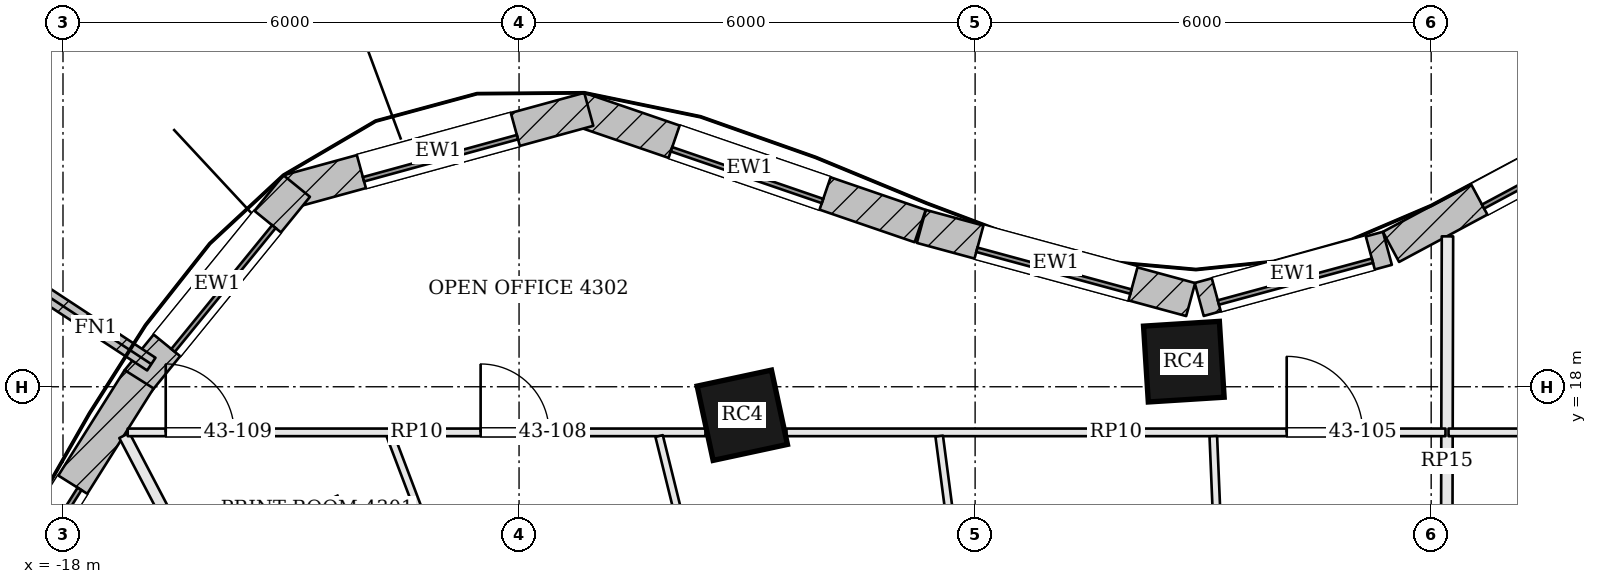
"""IFC4 building model, lengths in metres.
Left out: names, types, materials, properties, quantities, classifications, styles, units other than length and angle.
Written with IfcOpenShell. Run it as: python <this file> out.ifc"""

import sys

from ifc_helpers import new_model, si_unit, direction, frame, frame_2d, origin, origin_2d, place, context, subcontext, project, spatial, rectangle, extrude, element, fill, save


model = new_model("IFC4")
c1 = context("Model", 3, precision=1e-05, world=origin(), true_north=direction((0.0, 1.0)))
c2 = subcontext(c1, "Body", "Model", "MODEL_VIEW")
j1 = project(units=[si_unit("LENGTHUNIT", "METRE"), si_unit("PLANEANGLEUNIT", "RADIAN")], contexts=[c1])
p1 = place(None, origin())
s1 = spatial("IfcSite", under=j1, at=p1, CompositionType="ELEMENT")
p2 = place(p1, origin())
s2 = spatial("IfcBuilding", under=s1, at=p2, CompositionType="ELEMENT")
p3 = place(p2, frame((0.0, 0.0, 177.9)))
s3 = spatial("IfcBuildingStorey", under=s2, at=p3, CompositionType="ELEMENT", Elevation=177.9)
for number, where, z_axis, x_axis in (
    (1, (-3.254, 18.33, 0.0), (0.0, 0.0, 1.0), (-0.998, -0.063, 0.0)),
    (2, (-9.063, 17.625, 0.0), (0.0, 0.0, 1.0), (-0.978, -0.21, 0.0)),
    (3, (-14.643, 15.881, 0.0), (0.0, 0.0, 1.0), (-0.909, -0.417, 0.0)),
):
    element("IfcColumn", number, at=place(p3, frame(where, z_axis=z_axis, x_axis=x_axis)), inside=s3, PredefinedType="COLUMN", context=c2, shape_type="SweptSolid", body=[
        extrude(rectangle(XDim=1.0, YDim=1.0, at=origin_2d()), origin(), (0.0, 0.0, 1.0), 3.9),
    ])
p4 = place(p3, frame((3.646, 22.079, 0.0), z_axis=(0.0, 0.0, 1.0), x_axis=(-0.881279133897, -0.472596115259, 0.0)))
e4 = element("IfcWall", 4, at=p4, inside=s3, PredefinedType="SOLIDWALL", context=c2, shape_type="SweptSolid", body=[
    extrude(rectangle(XDim=4.737, YDim=0.45, at=frame_2d((2.368, 0.0))), origin(), (0.0, 0.0, 1.0), 3.7),
])
p5 = place(p4, frame((1.318, 0.0, 0.9)))
e5 = element("IfcOpeningElement", 5, at=p5, cuts=e4, PredefinedType="OPENING", context=c2, shape_type="SweptSolid", body=[
    extrude(rectangle(XDim=2.1, YDim=2.3, at=frame_2d((1.05, 1.15))), frame((0.0, 0.235, 0.0), z_axis=(0.0, -1.0, 0.0), x_axis=(1.0, 0.0, 0.0)), (0.0, 0.0, 1.0), 0.47),
])
p6 = place(p3, frame((-0.576, 19.821, 0.0), z_axis=(0.0, 0.0, 1.0), x_axis=(-0.965009398019, -0.262215296532, 0.0)))
e6 = element("IfcWall", 6, at=p6, inside=s3, PredefinedType="SOLIDWALL", context=c2, shape_type="SweptSolid", body=[
    extrude(rectangle(XDim=2.565, YDim=0.45, at=frame_2d((1.283, 0.0))), origin(), (0.0, 0.0, 1.0), 3.7),
])
p7 = place(p6, frame((0.233, 0.0, 0.9)))
e7 = element("IfcOpeningElement", 7, at=p7, cuts=e6, PredefinedType="OPENING", context=c2, shape_type="SweptSolid", body=[
    extrude(rectangle(XDim=2.1, YDim=2.3, at=frame_2d((1.05, 1.15))), frame((0.0, 0.235, 0.0), z_axis=(0.0, -1.0, 0.0), x_axis=(1.0, 0.0, 0.0)), (0.0, 0.0, 1.0), 0.47),
])
p8 = place(p3, frame((-3.164, 19.147, 0.0), z_axis=(0.0, 0.0, 1.0), x_axis=(-0.965039479998, 0.262104563191, 0.0)))
e8 = element("IfcWall", 8, at=p8, inside=s3, PredefinedType="SOLIDWALL", context=c2, shape_type="SweptSolid", body=[
    extrude(rectangle(XDim=3.672, YDim=0.45, at=frame_2d((1.836, 0.0))), origin(), (0.0, 0.0, 1.0), 3.7),
])
p9 = place(p8, frame((0.786, 0.0, 0.9)))
e9 = element("IfcOpeningElement", 9, at=p9, cuts=e8, PredefinedType="OPENING", context=c2, shape_type="SweptSolid", body=[
    extrude(rectangle(XDim=2.1, YDim=2.3, at=frame_2d((1.05, 1.15))), frame((0.0, 0.235, 0.0), z_axis=(0.0, -1.0, 0.0), x_axis=(1.0, 0.0, 0.0)), (0.0, 0.0, 1.0), 0.47),
])
p10 = place(p3, frame((-6.723, 20.114, 0.0), z_axis=(0.0, 0.0, 1.0), x_axis=(-0.945947299026, 0.324320377815, 0.0)))
e10 = element("IfcWall", 10, at=p10, inside=s3, PredefinedType="SOLIDWALL", context=c2, shape_type="SweptSolid", body=[
    extrude(rectangle(XDim=4.745, YDim=0.45, at=frame_2d((2.372, 0.0))), origin(), (0.0, 0.0, 1.0), 3.7),
])
p11 = place(p10, frame((1.322, 0.0, 0.9)))
e11 = element("IfcOpeningElement", 11, at=p11, cuts=e10, PredefinedType="OPENING", context=c2, shape_type="SweptSolid", body=[
    extrude(rectangle(XDim=2.1, YDim=2.3, at=frame_2d((1.05, 1.15))), frame((0.0, 0.235, 0.0), z_axis=(0.0, -1.0, 0.0), x_axis=(1.0, 0.0, 0.0)), (0.0, 0.0, 1.0), 0.47),
])
p12 = place(p3, frame((-11.083, 21.65, 0.0), z_axis=(0.0, 0.0, 1.0), x_axis=(-0.964483204983, -0.264144179011, 0.0)))
e12 = element("IfcWall", 12, at=p12, inside=s3, PredefinedType="SOLIDWALL", context=c2, shape_type="SweptSolid", body=[
    extrude(rectangle(XDim=4.104, YDim=0.45, at=frame_2d((2.052, 0.0))), origin(), (0.0, 0.0, 1.0), 3.7),
])
p13 = place(p12, frame((1.002, 0.0, 0.9)))
e13 = element("IfcOpeningElement", 13, at=p13, cuts=e12, PredefinedType="OPENING", context=c2, shape_type="SweptSolid", body=[
    extrude(rectangle(XDim=2.1, YDim=2.3, at=frame_2d((1.05, 1.15))), frame((0.0, 0.235, 0.0), z_axis=(0.0, -1.0, 0.0), x_axis=(1.0, 0.0, 0.0)), (0.0, 0.0, 1.0), 0.47),
])
p14 = place(p3, frame((-14.926, 20.641, 0.0), z_axis=(0.0, 0.0, 1.0), x_axis=(-0.631548074669, -0.775336720001, 0.0)))
e14 = element("IfcWall", 14, at=p14, inside=s3, PredefinedType="SOLIDWALL", context=c2, shape_type="SweptSolid", body=[
    extrude(rectangle(XDim=3.308, YDim=0.45, at=frame_2d((1.654, 0.0))), origin(), (0.0, 0.0, 1.0), 3.7),
])
p15 = place(p14, frame((0.604, 0.0, 0.9)))
e15 = element("IfcOpeningElement", 15, at=p15, cuts=e14, PredefinedType="OPENING", context=c2, shape_type="SweptSolid", body=[
    extrude(rectangle(XDim=2.1, YDim=2.3, at=frame_2d((1.05, 1.15))), frame((0.0, 0.235, 0.0), z_axis=(0.0, -1.0, 0.0), x_axis=(1.0, 0.0, 0.0)), (0.0, 0.0, 1.0), 0.47),
])
p16 = place(p3, frame((-16.998, 18.099, 0.0), z_axis=(0.0, 0.0, 1.0), x_axis=(-0.532745661304, -0.846275404559, 0.0)))
e16 = element("IfcWall", 16, at=p16, inside=s3, PredefinedType="SOLIDWALL", context=c2, shape_type="SweptSolid", body=[
    extrude(rectangle(XDim=5.076, YDim=0.45, at=frame_2d((2.538, 0.0))), origin(), (0.0, 0.0, 1.0), 3.7),
])
p17 = place(p16, frame((1.638, 0.0, 0.9)))
e17 = element("IfcOpeningElement", 17, at=p17, cuts=e16, PredefinedType="OPENING", context=c2, shape_type="SweptSolid", body=[
    extrude(rectangle(XDim=1.8, YDim=2.3, at=frame_2d((0.9, 1.15))), frame((0.0, 0.235, 0.0), z_axis=(0.0, -1.0, 0.0), x_axis=(1.0, 0.0, 0.0)), (0.0, 0.0, 1.0), 0.47),
])
p18 = place(p3, frame((-16.838, 18.298, 0.0), z_axis=(0.0, 0.0, 1.0), x_axis=(-0.835871900419, 0.548924554097, 0.0)))
e18 = element("IfcWall", 18, at=p18, inside=s3, PredefinedType="SOLIDWALL", context=c2, shape_type="SweptSolid", body=[
    extrude(rectangle(XDim=1.75, YDim=0.2, at=frame_2d((0.875, 0.0))), origin(), (0.0, 0.0, 1.0), 3.7),
])
p19 = place(p3, frame((0.214, 19.979, 0.0), z_axis=(0.0, 0.0, 1.0), x_axis=(-0.002357118586, -0.999997221992, 0.0)))
e19 = element("IfcWall", 19, at=p19, inside=s3, PredefinedType="PARTITIONING", context=c2, shape_type="SweptSolid", body=[
    extrude(rectangle(XDim=5.904, YDim=0.15, at=frame_2d((2.952, 0.0))), origin(), (0.0, 0.0, 1.0), 3.234),
])
p20 = place(p3, frame((-17.193, 17.36, 0.0), z_axis=(0.0, 0.0, 1.0), x_axis=(0.463995225493, -0.885837699988, 0.0)))
e20 = element("IfcWall", 20, at=p20, inside=s3, PredefinedType="PARTITIONING", context=c2, shape_type="SweptSolid", body=[
    extrude(rectangle(XDim=4.651, YDim=0.15, at=frame_2d((2.325, 0.0))), origin(), (0.0, 0.0, 1.0), 3.234),
])
p21 = place(p3, frame((0.228, 17.4, 0.0), z_axis=(0.0, 0.0, 1.0), x_axis=(1.0, 0.0, 0.0)))
e21 = element("IfcWall", 21, at=p21, inside=s3, PredefinedType="PARTITIONING", context=c2, shape_type="SweptSolid", body=[
    extrude(rectangle(XDim=7.596, YDim=0.1, at=frame_2d((3.798, 0.0))), origin(), (0.0, 0.0, 1.0), 3.084),
])
p22 = place(p21, frame((3.894, 0.0, 0.0)))
e22 = element("IfcOpeningElement", 22, at=p22, cuts=e21, PredefinedType="OPENING", context=c2, shape_type="SweptSolid", body=[
    extrude(rectangle(XDim=0.9, YDim=2.1, at=frame_2d((0.45, 1.05))), frame((0.0, 0.06, 0.0), z_axis=(0.0, -1.0, 0.0), x_axis=(1.0, 0.0, 0.0)), (0.0, 0.0, 1.0), 0.12),
])
p23 = place(p3, frame((-17.149, 17.4, 0.0), z_axis=(0.0, 0.0, 1.0), x_axis=(1.0, 0.0, 0.0)))
e23 = element("IfcWall", 23, at=p23, inside=s3, PredefinedType="PARTITIONING", context=c2, shape_type="SweptSolid", body=[
    extrude(rectangle(XDim=7.602, YDim=0.1, at=frame_2d((3.801, 0.0))), origin(), (0.0, 0.0, 1.0), 3.084),
])
p24 = place(p23, frame((4.643, 0.0, 0.0)))
e24 = element("IfcOpeningElement", 24, at=p24, cuts=e23, PredefinedType="OPENING", context=c2, shape_type="SweptSolid", body=[
    extrude(rectangle(XDim=0.9, YDim=2.1, at=frame_2d((0.45, 1.05))), frame((0.0, 0.06, 0.0), z_axis=(0.0, -1.0, 0.0), x_axis=(1.0, 0.0, 0.0)), (0.0, 0.0, 1.0), 0.12),
])
p25 = place(p23, frame((0.5, 0.0, 0.0)))
e25 = element("IfcOpeningElement", 25, at=p25, cuts=e23, PredefinedType="OPENING", context=c2, shape_type="SweptSolid", body=[
    extrude(rectangle(XDim=0.9, YDim=2.1, at=frame_2d((0.45, 1.05))), frame((0.0, 0.06, 0.0), z_axis=(0.0, -1.0, 0.0), x_axis=(1.0, 0.0, 0.0)), (0.0, 0.0, 1.0), 0.12),
])
p26 = place(p3, frame((-8.483, 17.4, 0.0), z_axis=(0.0, 0.0, 1.0), x_axis=(1.0, 0.0, 0.0)))
e26 = element("IfcWall", 26, at=p26, inside=s3, PredefinedType="PARTITIONING", context=c2, shape_type="SweptSolid", body=[
    extrude(rectangle(XDim=8.671, YDim=0.1, at=frame_2d((4.335, 0.0))), origin(), (0.0, 0.0, 1.0), 3.084),
])
p27 = place(p26, frame((6.582, 0.0, 0.0)))
e27 = element("IfcOpeningElement", 27, at=p27, cuts=e26, PredefinedType="OPENING", context=c2, shape_type="SweptSolid", body=[
    extrude(rectangle(XDim=1.0, YDim=2.1, at=frame_2d((0.5, 1.05))), frame((0.0, 0.06, 0.0), z_axis=(0.0, -1.0, 0.0), x_axis=(1.0, 0.0, 0.0)), (0.0, 0.0, 1.0), 0.12),
])
p28 = place(p3, frame((-2.729, 14.075, 0.0), z_axis=(0.0, 0.0, 1.0), x_axis=(-0.042005382394, 0.99911738442, 0.0)))
e28 = element("IfcWall", 28, at=p28, inside=s3, PredefinedType="PARTITIONING", context=c2, shape_type="SweptSolid", body=[
    extrude(rectangle(XDim=3.278, YDim=0.1, at=frame_2d((1.639, 0.0))), origin(), (0.0, 0.0, 1.0), 3.084),
])
p29 = place(p3, frame((-6.043, 14.074, 0.0), z_axis=(0.0, 0.0, 1.0), x_axis=(-0.12990779889, 0.991526078219, 0.0)))
e29 = element("IfcWall", 29, at=p29, inside=s3, PredefinedType="PARTITIONING", context=c2, shape_type="SweptSolid", body=[
    extrude(rectangle(XDim=3.304, YDim=0.1, at=frame_2d((1.652, 0.0))), origin(), (0.0, 0.0, 1.0), 3.084),
])
p30 = place(p3, frame((-9.347, 14.073, 0.0), z_axis=(0.0, 0.0, 1.0), x_axis=(-0.239847329474, 0.970810619299, 0.0)))
e30 = element("IfcWall", 30, at=p30, inside=s3, PredefinedType="PARTITIONING", context=c2, shape_type="SweptSolid", body=[
    extrude(rectangle(XDim=3.377, YDim=0.1, at=frame_2d((1.689, 0.0))), origin(), (0.0, 0.0, 1.0), 3.084),
])
p31 = place(p3, frame((-12.447, 14.07, 0.0), z_axis=(0.0, 0.0, 1.0), x_axis=(-0.354534757725, 0.935042836219, 0.0)))
e31 = element("IfcWall", 31, at=p31, inside=s3, PredefinedType="PARTITIONING", context=c2, shape_type="SweptSolid", body=[
    extrude(rectangle(XDim=3.511, YDim=0.1, at=frame_2d((1.756, 0.0))), origin(), (0.0, 0.0, 1.0), 3.084),
])
p32 = place(p5, origin())
e32 = element("IfcWindow", 32, at=p32, inside=s3, PartitioningType="SINGLE_PANEL", PredefinedType="WINDOW", context=c2, shape_type="SweptSolid", body=[
    extrude(rectangle(XDim=2.1, YDim=2.3, at=frame_2d((1.05, 1.15))), frame((0.0, 0.135, 0.0), z_axis=(0.0, -1.0, 0.0), x_axis=(1.0, 0.0, 0.0)), (0.0, 0.0, 1.0), 0.06),
])
fill(e5, e32)
p33 = place(p7, origin())
e33 = element("IfcWindow", 33, at=p33, inside=s3, PartitioningType="SINGLE_PANEL", PredefinedType="WINDOW", context=c2, shape_type="SweptSolid", body=[
    extrude(rectangle(XDim=2.1, YDim=2.3, at=frame_2d((1.05, 1.15))), frame((0.0, 0.135, 0.0), z_axis=(0.0, -1.0, 0.0), x_axis=(1.0, 0.0, 0.0)), (0.0, 0.0, 1.0), 0.06),
])
fill(e7, e33)
p34 = place(p9, origin())
e34 = element("IfcWindow", 34, at=p34, inside=s3, PartitioningType="SINGLE_PANEL", PredefinedType="WINDOW", context=c2, shape_type="SweptSolid", body=[
    extrude(rectangle(XDim=2.1, YDim=2.3, at=frame_2d((1.05, 1.15))), frame((0.0, 0.135, 0.0), z_axis=(0.0, -1.0, 0.0), x_axis=(1.0, 0.0, 0.0)), (0.0, 0.0, 1.0), 0.06),
])
fill(e9, e34)
p35 = place(p11, origin())
e35 = element("IfcWindow", 35, at=p35, inside=s3, PartitioningType="SINGLE_PANEL", PredefinedType="WINDOW", context=c2, shape_type="SweptSolid", body=[
    extrude(rectangle(XDim=2.1, YDim=2.3, at=frame_2d((1.05, 1.15))), frame((0.0, 0.135, 0.0), z_axis=(0.0, -1.0, 0.0), x_axis=(1.0, 0.0, 0.0)), (0.0, 0.0, 1.0), 0.06),
])
fill(e11, e35)
p36 = place(p13, origin())
e36 = element("IfcWindow", 36, at=p36, inside=s3, PartitioningType="SINGLE_PANEL", PredefinedType="WINDOW", context=c2, shape_type="SweptSolid", body=[
    extrude(rectangle(XDim=2.1, YDim=2.3, at=frame_2d((1.05, 1.15))), frame((0.0, 0.135, 0.0), z_axis=(0.0, -1.0, 0.0), x_axis=(1.0, 0.0, 0.0)), (0.0, 0.0, 1.0), 0.06),
])
fill(e13, e36)
p37 = place(p15, origin())
e37 = element("IfcWindow", 37, at=p37, inside=s3, PartitioningType="SINGLE_PANEL", PredefinedType="WINDOW", context=c2, shape_type="SweptSolid", body=[
    extrude(rectangle(XDim=2.1, YDim=2.3, at=frame_2d((1.05, 1.15))), frame((0.0, 0.135, 0.0), z_axis=(0.0, -1.0, 0.0), x_axis=(1.0, 0.0, 0.0)), (0.0, 0.0, 1.0), 0.06),
])
fill(e15, e37)
p38 = place(p17, origin())
e38 = element("IfcWindow", 38, at=p38, inside=s3, PartitioningType="SINGLE_PANEL", PredefinedType="WINDOW", context=c2, shape_type="SweptSolid", body=[
    extrude(rectangle(XDim=1.8, YDim=2.3, at=frame_2d((0.9, 1.15))), frame((0.0, 0.135, 0.0), z_axis=(0.0, -1.0, 0.0), x_axis=(1.0, 0.0, 0.0)), (0.0, 0.0, 1.0), 0.06),
])
fill(e17, e38)
p39 = place(p27, origin())
e39 = element("IfcDoor", 39, at=p39, inside=s3, OperationType="SINGLE_SWING_LEFT", PredefinedType="DOOR", context=c2, shape_type="SweptSolid", body=[
    extrude(rectangle(XDim=1.0, YDim=2.1, at=frame_2d((0.5, 1.05))), frame((0.0, 0.025, 0.0), z_axis=(0.0, -1.0, 0.0), x_axis=(1.0, 0.0, 0.0)), (0.0, 0.0, 1.0), 0.05),
])
fill(e27, e39)
p40 = place(p24, origin())
e40 = element("IfcDoor", 40, at=p40, inside=s3, OperationType="SINGLE_SWING_LEFT", PredefinedType="DOOR", context=c2, shape_type="SweptSolid", body=[
    extrude(rectangle(XDim=0.9, YDim=2.1, at=frame_2d((0.45, 1.05))), frame((0.0, 0.025, 0.0), z_axis=(0.0, -1.0, 0.0), x_axis=(1.0, 0.0, 0.0)), (0.0, 0.0, 1.0), 0.05),
])
fill(e24, e40)
p41 = place(p25, origin())
e41 = element("IfcDoor", 41, at=p41, inside=s3, OperationType="SINGLE_SWING_LEFT", PredefinedType="DOOR", context=c2, shape_type="SweptSolid", body=[
    extrude(rectangle(XDim=0.9, YDim=2.1, at=frame_2d((0.45, 1.05))), frame((0.0, 0.025, 0.0), z_axis=(0.0, -1.0, 0.0), x_axis=(1.0, 0.0, 0.0)), (0.0, 0.0, 1.0), 0.05),
])
fill(e25, e41)
save(model, sys.argv[1])
